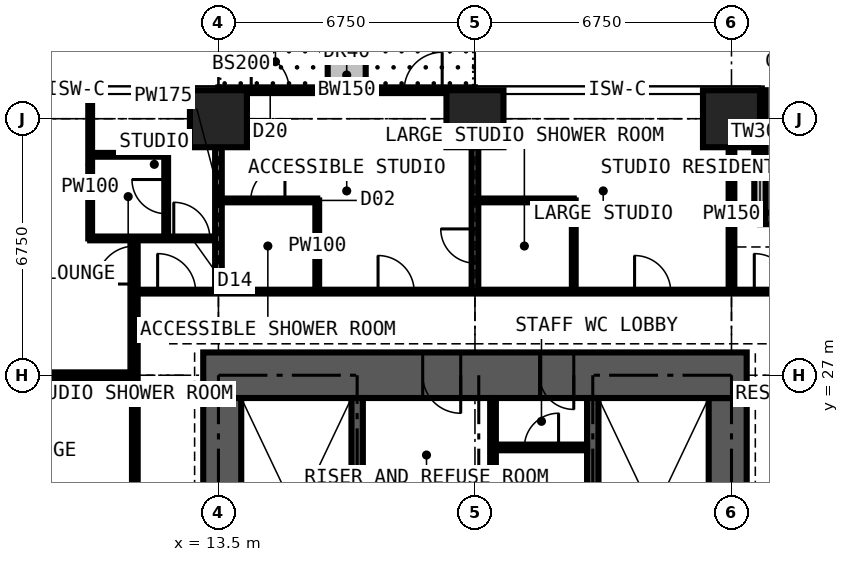
"""IFC4 building model, lengths in metres.
Left out: names, types, materials, properties, quantities, classifications, styles, units other than length and angle.
Written with IfcOpenShell. Run it as: python <this file> out.ifc"""

import sys

from ifc_helpers import new_model, si_unit, direction, frame, frame_2d, origin, origin_2d, place, context, subcontext, project, spatial, rectangle, extrude, element, fill, save


model = new_model("IFC4")
c1 = context("Model", 3, precision=1e-05, world=origin(), true_north=direction((0.0, 1.0)))
c2 = subcontext(c1, "Body", "Model", "MODEL_VIEW")
j1 = project(units=[si_unit("LENGTHUNIT", "METRE"), si_unit("PLANEANGLEUNIT", "RADIAN")], contexts=[c1])
p1 = place(None, origin())
s1 = spatial("IfcSite", under=j1, at=p1, CompositionType="ELEMENT")
p2 = place(p1, origin())
s2 = spatial("IfcBuilding", under=s1, at=p2, CompositionType="ELEMENT")
p3 = place(p2, frame((0.0, 0.0, 163.8)))
s3 = spatial("IfcBuildingStorey", under=s2, at=p3, CompositionType="ELEMENT", Elevation=163.8)
for number, where, z_axis, x_axis in (
    (1, (13.5, 33.75, 0.0), (0.0, 0.0, 1.0), (1.0, 0.0, 0.0)),
    (2, (20.25, 33.75, 0.0), (0.0, 0.0, 1.0), (1.0, 0.0, 0.0)),
    (3, (27.0, 33.75, 0.0), (0.0, 0.0, 1.0), (1.0, 0.0, 0.0)),
):
    element("IfcColumn", number, at=place(p3, frame(where, z_axis=z_axis, x_axis=x_axis)), inside=s3, PredefinedType="COLUMN", context=c2, shape_type="SweptSolid", body=[
        extrude(rectangle(XDim=1.5, YDim=1.5, at=origin_2d()), origin(), (0.0, 0.0, 1.0), 3.6),
    ])
p4 = place(p3, frame((26.9, 14.1, 0.0), z_axis=(0.0, 0.0, 1.0), x_axis=(0.0, 1.0, 0.0)))
e4 = element("IfcWall", 4, at=p4, inside=s3, PredefinedType="SHEAR", context=c2, shape_type="SweptSolid", body=[
    extrude(rectangle(XDim=12.3, YDim=1.0, at=frame_2d((6.15, 0.0))), origin(), (0.0, 0.0, 1.0), 3.6),
])
p5 = place(p4, frame((3.65, 0.0, 0.0)))
e5 = element("IfcOpeningElement", 5, at=p5, cuts=e4, PredefinedType="OPENING", context=c2, shape_type="SweptSolid", body=[
    extrude(rectangle(XDim=1.2, YDim=2.2, at=frame_2d((0.6, 1.1))), frame((0.0, 0.51, 0.0), z_axis=(0.0, -1.0, 0.0), x_axis=(1.0, 0.0, 0.0)), (0.0, 0.0, 1.0), 1.02),
])
p6 = place(p3, frame((27.4, 27.0, 0.0), z_axis=(0.0, 0.0, 1.0), x_axis=(-1.0, 0.0, 0.0)))
e6 = element("IfcWall", 6, at=p6, inside=s3, PredefinedType="SHEAR", context=c2, shape_type="SweptSolid", body=[
    extrude(rectangle(XDim=14.3, YDim=1.2, at=frame_2d((7.15, 0.0))), origin(), (0.0, 0.0, 1.0), 3.6),
])
p7 = place(p6, frame((4.55, 0.0, 0.0)))
e7 = element("IfcOpeningElement", 7, at=p7, cuts=e6, PredefinedType="OPENING", context=c2, shape_type="SweptSolid", body=[
    extrude(rectangle(XDim=0.9, YDim=2.2, at=frame_2d((0.45, 1.1))), frame((0.0, 0.61, 0.0), z_axis=(0.0, -1.0, 0.0), x_axis=(1.0, 0.0, 0.0)), (0.0, 0.0, 1.0), 1.22),
])
p8 = place(p6, frame((7.525, 0.0, 0.0)))
e8 = element("IfcOpeningElement", 8, at=p8, cuts=e6, PredefinedType="OPENING", context=c2, shape_type="SweptSolid", body=[
    extrude(rectangle(XDim=1.0, YDim=2.2, at=frame_2d((0.5, 1.1))), frame((0.0, 0.61, 0.0), z_axis=(0.0, -1.0, 0.0), x_axis=(1.0, 0.0, 0.0)), (0.0, 0.0, 1.0), 1.22),
])
p9 = place(p3, frame((13.6, 26.4, 0.0), z_axis=(0.0, 0.0, 1.0), x_axis=(0.0, -1.0, 0.0)))
e9 = element("IfcWall", 9, at=p9, inside=s3, PredefinedType="SHEAR", context=c2, shape_type="SweptSolid", body=[
    extrude(rectangle(XDim=12.3, YDim=1.0, at=frame_2d((6.15, 0.0))), origin(), (0.0, 0.0, 1.0), 3.6),
])
p10 = place(p9, frame((7.45, 0.0, 0.0)))
e10 = element("IfcOpeningElement", 10, at=p10, cuts=e9, PredefinedType="OPENING", context=c2, shape_type="SweptSolid", body=[
    extrude(rectangle(XDim=1.2, YDim=2.2, at=frame_2d((0.6, 1.1))), frame((0.0, 0.51, 0.0), z_axis=(0.0, -1.0, 0.0), x_axis=(1.0, 0.0, 0.0)), (0.0, 0.0, 1.0), 1.02),
])
p11 = place(p3, frame((31.125, 31.125, 0.0), z_axis=(0.0, 0.0, 1.0), x_axis=(-1.0, 0.0, 0.0)))
e11 = element("IfcWall", 11, at=p11, inside=s3, PredefinedType="SOLIDWALL", context=c2, shape_type="SweptSolid", body=[
    extrude(rectangle(XDim=3.375, YDim=0.3, at=frame_2d((1.688, 0.0))), origin(), (0.0, 0.0, 1.0), 3.375),
])
p12 = place(p11, frame((0.788, 0.0, 0.6)))
e12 = element("IfcOpeningElement", 12, at=p12, cuts=e11, PredefinedType="OPENING", context=c2, shape_type="SweptSolid", body=[
    extrude(rectangle(XDim=1.8, YDim=2.1, at=frame_2d((0.9, 1.05))), frame((0.0, 0.16, 0.0), z_axis=(0.0, -1.0, 0.0), x_axis=(1.0, 0.0, 0.0)), (0.0, 0.0, 1.0), 0.32),
])
p13 = place(p3, frame((27.75, 31.125, 0.0), z_axis=(0.0, 0.0, 1.0), x_axis=(0.0, 1.0, 0.0)))
e13 = element("IfcWall", 13, at=p13, inside=s3, PredefinedType="SOLIDWALL", context=c2, shape_type="SweptSolid", body=[
    extrude(rectangle(XDim=3.375, YDim=0.3, at=frame_2d((1.688, 0.0))), origin(), (0.0, 0.0, 1.0), 3.375),
])
p14 = place(p13, frame((0.268, 0.0, 0.9)))
e14 = element("IfcOpeningElement", 14, at=p14, cuts=e13, PredefinedType="OPENING", context=c2, shape_type="SweptSolid", body=[
    extrude(rectangle(XDim=1.5, YDim=1.8, at=frame_2d((0.75, 0.9))), frame((0.0, 0.16, 0.0), z_axis=(0.0, -1.0, 0.0), x_axis=(1.0, 0.0, 0.0)), (0.0, 0.0, 1.0), 0.32),
])
p15 = place(p3, frame((13.5, 34.5, 0.0), z_axis=(0.0, 0.0, 1.0), x_axis=(1.0, 0.0, 0.0)))
e15 = element("IfcWall", 15, at=p15, inside=s3, PredefinedType="SOLIDWALL", context=c2, shape_type="SweptSolid", body=[
    extrude(rectangle(XDim=6.75, YDim=0.15, at=frame_2d((3.375, 0.0))), origin(), (0.0, 0.0, 1.0), 3.375),
])
p16 = place(p15, frame((0.863, 0.0, 0.0)))
e16 = element("IfcOpeningElement", 16, at=p16, cuts=e15, PredefinedType="OPENING", context=c2, shape_type="SweptSolid", body=[
    extrude(rectangle(XDim=1.0, YDim=2.2, at=frame_2d((0.5, 1.1))), frame((0.0, 0.085, 0.0), z_axis=(0.0, -1.0, 0.0), x_axis=(1.0, 0.0, 0.0)), (0.0, 0.0, 1.0), 0.17),
])
p17 = place(p15, frame((1.975, 0.0, 0.9)))
e17 = element("IfcOpeningElement", 17, at=p17, cuts=e15, PredefinedType="OPENING", context=c2, shape_type="SweptSolid", body=[
    extrude(rectangle(XDim=1.2, YDim=1.8, at=frame_2d((0.6, 0.9))), frame((0.0, 0.085, 0.0), z_axis=(0.0, -1.0, 0.0), x_axis=(1.0, 0.0, 0.0)), (0.0, 0.0, 1.0), 0.17),
])
p18 = place(p15, frame((4.887, 0.0, 0.0)))
e18 = element("IfcOpeningElement", 18, at=p18, cuts=e15, PredefinedType="OPENING", context=c2, shape_type="SweptSolid", body=[
    extrude(rectangle(XDim=1.0, YDim=2.2, at=frame_2d((0.5, 1.1))), frame((0.0, 0.085, 0.0), z_axis=(0.0, -1.0, 0.0), x_axis=(1.0, 0.0, 0.0)), (0.0, 0.0, 1.0), 0.17),
])
p19 = place(p15, frame((3.575, 0.0, 0.9)))
e19 = element("IfcOpeningElement", 19, at=p19, cuts=e15, PredefinedType="OPENING", context=c2, shape_type="SweptSolid", body=[
    extrude(rectangle(XDim=1.2, YDim=1.8, at=frame_2d((0.6, 0.9))), frame((0.0, 0.085, 0.0), z_axis=(0.0, -1.0, 0.0), x_axis=(1.0, 0.0, 0.0)), (0.0, 0.0, 1.0), 0.17),
])
p20 = place(p3, frame((16.875, 34.6, 0.0), z_axis=(0.0, 0.0, 1.0), x_axis=(0.0, 1.0, 0.0)))
e20 = element("IfcWall", 20, at=p20, inside=s3, PredefinedType="USERDEFINED", context=c2, shape_type="SweptSolid", body=[
    extrude(rectangle(XDim=2.2, YDim=1.0, at=frame_2d((1.1, 0.0))), origin(), (0.0, 0.0, 1.0), 0.9),
])
for number, where, z_axis, x_axis in (
    (21, (17.15, 20.3, 0.0), (0.0, 0.0, 1.0), (0.0, 1.0, 0.0)),
    (22, (23.35, 20.3, 0.0), (0.0, 0.0, 1.0), (0.0, 1.0, 0.0)),
):
    element("IfcWall", number, at=place(p3, frame(where, z_axis=z_axis, x_axis=x_axis)), inside=s3, PredefinedType="SHEAR", context=c2, shape_type="SweptSolid", body=[
        extrude(rectangle(XDim=6.1, YDim=0.3, at=frame_2d((3.05, 0.0))), origin(), (0.0, 0.0, 1.0), 3.6),
    ])
p21 = place(p3, frame((20.725, 23.4, 0.0), z_axis=(0.0, 0.0, 1.0), x_axis=(0.0, 1.0, 0.0)))
e23 = element("IfcWall", 23, at=p21, inside=s3, PredefinedType="PARTITIONING", context=c2, shape_type="SweptSolid", body=[
    extrude(rectangle(XDim=3.0, YDim=0.15, at=frame_2d((1.5, 0.0))), origin(), (0.0, 0.0, 1.0), 3.375),
])
p22 = place(p3, frame((20.8, 25.1, 0.0), z_axis=(0.0, 0.0, 1.0), x_axis=(1.0, 0.0, 0.0)))
e24 = element("IfcWall", 24, at=p22, inside=s3, PredefinedType="PARTITIONING", context=c2, shape_type="SweptSolid", body=[
    extrude(rectangle(XDim=2.4, YDim=0.15, at=frame_2d((1.2, 0.0))), origin(), (0.0, 0.0, 1.0), 3.375),
])
p23 = place(p22, frame((0.75, 0.0, 0.0)))
e25 = element("IfcOpeningElement", 25, at=p23, cuts=e24, PredefinedType="OPENING", context=c2, shape_type="SweptSolid", body=[
    extrude(rectangle(XDim=0.9, YDim=2.2, at=frame_2d((0.45, 1.1))), frame((0.0, 0.085, 0.0), z_axis=(0.0, -1.0, 0.0), x_axis=(1.0, 0.0, 0.0)), (0.0, 0.0, 1.0), 0.17),
])
p24 = place(p3, frame((3.35, 27.0, 0.0), z_axis=(0.0, 0.0, 1.0), x_axis=(1.0, 0.0, 0.0)))
e26 = element("IfcWall", 26, at=p24, inside=s3, PredefinedType="PARTITIONING", context=c2, shape_type="SweptSolid", body=[
    extrude(rectangle(XDim=7.95, YDim=0.15, at=frame_2d((3.975, 0.0))), origin(), (0.0, 0.0, 1.0), 2.806),
])
p25 = place(p3, frame((10.125, 30.6, 0.0), z_axis=(0.0, 0.0, 1.0), x_axis=(0.0, 1.0, 0.0)))
e27 = element("IfcWall", 27, at=p25, inside=s3, PredefinedType="PARTITIONING", context=c2, shape_type="SweptSolid", body=[
    extrude(rectangle(XDim=3.884, YDim=0.1, at=frame_2d((1.942, 0.0))), origin(), (0.0, 0.0, 1.0), 3.375),
])
p26 = place(p3, frame((10.125, 30.6, 0.0), z_axis=(0.0, 0.0, 1.0), x_axis=(1.0, 0.0, 0.0)))
e28 = element("IfcWall", 28, at=p26, inside=s3, PredefinedType="PARTITIONING", context=c2, shape_type="SweptSolid", body=[
    extrude(rectangle(XDim=3.375, YDim=0.1, at=frame_2d((1.688, 0.0))), origin(), (0.0, 0.0, 1.0), 3.375),
])
p27 = place(p26, frame((2.2, 0.0, 0.0)))
e29 = element("IfcOpeningElement", 29, at=p27, cuts=e28, PredefinedType="OPENING", context=c2, shape_type="SweptSolid", body=[
    extrude(rectangle(XDim=0.95, YDim=2.2, at=frame_2d((0.475, 1.1))), frame((0.0, 0.06, 0.0), z_axis=(0.0, -1.0, 0.0), x_axis=(1.0, 0.0, 0.0)), (0.0, 0.0, 1.0), 0.12),
])
p28 = place(p3, frame((10.125, 32.8, 0.0), z_axis=(0.0, 0.0, 1.0), x_axis=(1.0, 0.0, 0.0)))
e30 = element("IfcWall", 30, at=p28, inside=s3, PredefinedType="PARTITIONING", context=c2, shape_type="SweptSolid", body=[
    extrude(rectangle(XDim=2.0, YDim=0.1, at=frame_2d((1.0, 0.0))), origin(), (0.0, 0.0, 1.0), 3.375),
])
p29 = place(p3, frame((11.3, 11.3, 0.0), z_axis=(0.0, 0.0, 1.0), x_axis=(0.0, 1.0, 0.0)))
e31 = element("IfcWall", 31, at=p29, inside=s3, PredefinedType="PARTITIONING", context=c2, shape_type="SweptSolid", body=[
    extrude(rectangle(XDim=19.3, YDim=0.15, at=frame_2d((9.65, 0.0))), origin(), (0.0, 0.0, 1.0), 3.375),
])
p30 = place(p29, frame((18.1, 0.0, 0.0)))
e32 = element("IfcOpeningElement", 32, at=p30, cuts=e31, PredefinedType="OPENING", context=c2, shape_type="SweptSolid", body=[
    extrude(rectangle(XDim=1.0, YDim=2.2, at=frame_2d((0.5, 1.1))), frame((0.0, 0.085, 0.0), z_axis=(0.0, -1.0, 0.0), x_axis=(1.0, 0.0, 0.0)), (0.0, 0.0, 1.0), 0.17),
])
p31 = place(p29, frame((10.137, 0.0, 0.0)))
e33 = element("IfcOpeningElement", 33, at=p31, cuts=e31, PredefinedType="OPENING", context=c2, shape_type="SweptSolid", body=[
    extrude(rectangle(XDim=1.0, YDim=2.2, at=frame_2d((0.5, 1.1))), frame((0.0, 0.085, 0.0), z_axis=(0.0, -1.0, 0.0), x_axis=(1.0, 0.0, 0.0)), (0.0, 0.0, 1.0), 0.17),
])
p32 = place(p3, frame((11.3, 29.2, 0.0), z_axis=(0.0, 0.0, 1.0), x_axis=(1.0, 0.0, 0.0)))
e34 = element("IfcWall", 34, at=p32, inside=s3, PredefinedType="PARTITIONING", context=c2, shape_type="SweptSolid", body=[
    extrude(rectangle(XDim=19.809, YDim=0.1, at=frame_2d((9.904, 0.0))), origin(), (0.0, 0.0, 1.0), 3.375),
])
p33 = place(p32, frame((16.3, 0.0, 0.0)))
e35 = element("IfcOpeningElement", 35, at=p33, cuts=e34, PredefinedType="OPENING", context=c2, shape_type="SweptSolid", body=[
    extrude(rectangle(XDim=1.0, YDim=2.2, at=frame_2d((0.5, 1.1))), frame((0.0, 0.06, 0.0), z_axis=(0.0, -1.0, 0.0), x_axis=(1.0, 0.0, 0.0)), (0.0, 0.0, 1.0), 0.12),
])
p34 = place(p32, frame((6.4, 0.0, 0.0)))
e36 = element("IfcOpeningElement", 36, at=p34, cuts=e34, PredefinedType="OPENING", context=c2, shape_type="SweptSolid", body=[
    extrude(rectangle(XDim=0.95, YDim=2.2, at=frame_2d((0.475, 1.1))), frame((0.0, 0.06, 0.0), z_axis=(0.0, -1.0, 0.0), x_axis=(1.0, 0.0, 0.0)), (0.0, 0.0, 1.0), 0.12),
])
p35 = place(p32, frame((13.15, 0.0, 0.0)))
e37 = element("IfcOpeningElement", 37, at=p35, cuts=e34, PredefinedType="OPENING", context=c2, shape_type="SweptSolid", body=[
    extrude(rectangle(XDim=0.95, YDim=2.2, at=frame_2d((0.475, 1.1))), frame((0.0, 0.06, 0.0), z_axis=(0.0, -1.0, 0.0), x_axis=(1.0, 0.0, 0.0)), (0.0, 0.0, 1.0), 0.12),
])
p36 = place(p32, frame((0.6, 0.0, 0.0)))
e38 = element("IfcOpeningElement", 38, at=p36, cuts=e34, PredefinedType="OPENING", context=c2, shape_type="SweptSolid", body=[
    extrude(rectangle(XDim=1.0, YDim=2.2, at=frame_2d((0.5, 1.1))), frame((0.0, 0.06, 0.0), z_axis=(0.0, -1.0, 0.0), x_axis=(1.0, 0.0, 0.0)), (0.0, 0.0, 1.0), 0.12),
])
p37 = place(p3, frame((12.125, 30.6, 0.0), z_axis=(0.0, 0.0, 1.0), x_axis=(0.0, 1.0, 0.0)))
e39 = element("IfcWall", 39, at=p37, inside=s3, PredefinedType="PARTITIONING", context=c2, shape_type="SweptSolid", body=[
    extrude(rectangle(XDim=2.2, YDim=0.1, at=frame_2d((1.1, 0.0))), origin(), (0.0, 0.0, 1.0), 3.375),
])
p38 = place(p37, frame((0.65, 0.0, 0.0)))
e40 = element("IfcOpeningElement", 40, at=p38, cuts=e39, PredefinedType="OPENING", context=c2, shape_type="SweptSolid", body=[
    extrude(rectangle(XDim=0.9, YDim=2.2, at=frame_2d((0.45, 1.1))), frame((0.0, 0.06, 0.0), z_axis=(0.0, -1.0, 0.0), x_axis=(1.0, 0.0, 0.0)), (0.0, 0.0, 1.0), 0.12),
])
p39 = place(p3, frame((13.5, 29.2, 0.0), z_axis=(0.0, 0.0, 1.0), x_axis=(0.0, 1.0, 0.0)))
e41 = element("IfcWall", 41, at=p39, inside=s3, PredefinedType="PARTITIONING", context=c2, shape_type="SweptSolid", body=[
    extrude(rectangle(XDim=5.284, YDim=0.175, at=frame_2d((2.642, 0.0))), origin(), (0.0, 0.0, 1.0), 2.806),
])
p40 = place(p3, frame((13.5, 31.6, 0.0), z_axis=(0.0, 0.0, 1.0), x_axis=(1.0, 0.0, 0.0)))
e42 = element("IfcWall", 42, at=p40, inside=s3, PredefinedType="PARTITIONING", context=c2, shape_type="SweptSolid", body=[
    extrude(rectangle(XDim=2.6, YDim=0.1, at=frame_2d((1.3, 0.0))), origin(), (0.0, 0.0, 1.0), 3.375),
])
p41 = place(p40, frame((0.85, 0.0, 0.0)))
e43 = element("IfcOpeningElement", 43, at=p41, cuts=e42, PredefinedType="OPENING", context=c2, shape_type="SweptSolid", body=[
    extrude(rectangle(XDim=0.9, YDim=2.2, at=frame_2d((0.45, 1.1))), frame((0.0, 0.06, 0.0), z_axis=(0.0, -1.0, 0.0), x_axis=(1.0, 0.0, 0.0)), (0.0, 0.0, 1.0), 0.12),
])
p42 = place(p3, frame((16.1, 29.2, 0.0), z_axis=(0.0, 0.0, 1.0), x_axis=(0.0, 1.0, 0.0)))
e44 = element("IfcWall", 44, at=p42, inside=s3, PredefinedType="PARTITIONING", context=c2, shape_type="SweptSolid", body=[
    extrude(rectangle(XDim=2.4, YDim=0.1, at=frame_2d((1.2, 0.0))), origin(), (0.0, 0.0, 1.0), 3.375),
])
p43 = place(p3, frame((20.25, 29.2, 0.0), z_axis=(0.0, 0.0, 1.0), x_axis=(0.0, 1.0, 0.0)))
e45 = element("IfcWall", 45, at=p43, inside=s3, PredefinedType="PARTITIONING", context=c2, shape_type="SweptSolid", body=[
    extrude(rectangle(XDim=5.284, YDim=0.175, at=frame_2d((2.642, 0.0))), origin(), (0.0, 0.0, 1.0), 2.806),
])
p44 = place(p43, frame((0.75, 0.0, 0.0)))
e46 = element("IfcOpeningElement", 46, at=p44, cuts=e45, PredefinedType="OPENING", context=c2, shape_type="SweptSolid", body=[
    extrude(rectangle(XDim=0.9, YDim=2.2, at=frame_2d((0.45, 1.1))), frame((0.0, 0.097, 0.0), z_axis=(0.0, -1.0, 0.0), x_axis=(1.0, 0.0, 0.0)), (0.0, 0.0, 1.0), 0.195),
])
p45 = place(p3, frame((20.25, 31.6, 0.0), z_axis=(0.0, 0.0, 1.0), x_axis=(1.0, 0.0, 0.0)))
e47 = element("IfcWall", 47, at=p45, inside=s3, PredefinedType="PARTITIONING", context=c2, shape_type="SweptSolid", body=[
    extrude(rectangle(XDim=2.6, YDim=0.1, at=frame_2d((1.3, 0.0))), origin(), (0.0, 0.0, 1.0), 3.375),
])
p46 = place(p3, frame((22.85, 29.2, 0.0), z_axis=(0.0, 0.0, 1.0), x_axis=(0.0, 1.0, 0.0)))
e48 = element("IfcWall", 48, at=p46, inside=s3, PredefinedType="PARTITIONING", context=c2, shape_type="SweptSolid", body=[
    extrude(rectangle(XDim=2.4, YDim=0.1, at=frame_2d((1.2, 0.0))), origin(), (0.0, 0.0, 1.0), 3.375),
])
p47 = place(p3, frame((27.0, 29.2, 0.0), z_axis=(0.0, 0.0, 1.0), x_axis=(0.0, 1.0, 0.0)))
e49 = element("IfcWall", 49, at=p47, inside=s3, PredefinedType="PARTITIONING", context=c2, shape_type="SweptSolid", body=[
    extrude(rectangle(XDim=5.284, YDim=0.15, at=frame_2d((2.642, 0.0))), origin(), (0.0, 0.0, 1.0), 2.806),
])
p48 = place(p14, origin())
e50 = element("IfcWindow", 50, at=p48, inside=s3, PartitioningType="SINGLE_PANEL", PredefinedType="WINDOW", context=c2, shape_type="SweptSolid", body=[
    extrude(rectangle(XDim=1.5, YDim=1.8, at=frame_2d((0.75, 0.9))), frame((0.0, 0.03, 0.0), z_axis=(0.0, -1.0, 0.0), x_axis=(1.0, 0.0, 0.0)), (0.0, 0.0, 1.0), 0.06),
])
fill(e14, e50)
p49 = place(p16, origin())
e51 = element("IfcDoor", 51, at=p49, inside=s3, OperationType="SINGLE_SWING_LEFT", PredefinedType="DOOR", context=c2, shape_type="SweptSolid", body=[
    extrude(rectangle(XDim=1.0, YDim=2.2, at=frame_2d((0.5, 1.1))), frame((0.0, 0.025, 0.0), z_axis=(0.0, -1.0, 0.0), x_axis=(1.0, 0.0, 0.0)), (0.0, 0.0, 1.0), 0.05),
])
fill(e16, e51)
p50 = place(p17, origin())
e52 = element("IfcWindow", 52, at=p50, inside=s3, PartitioningType="SINGLE_PANEL", PredefinedType="WINDOW", context=c2, shape_type="SweptSolid", body=[
    extrude(rectangle(XDim=1.2, YDim=1.8, at=frame_2d((0.6, 0.9))), frame((0.0, 0.03, 0.0), z_axis=(0.0, -1.0, 0.0), x_axis=(1.0, 0.0, 0.0)), (0.0, 0.0, 1.0), 0.06),
])
fill(e17, e52)
p51 = place(p18, origin())
e53 = element("IfcDoor", 53, at=p51, inside=s3, OperationType="SINGLE_SWING_RIGHT", PredefinedType="DOOR", context=c2, shape_type="SweptSolid", body=[
    extrude(rectangle(XDim=1.0, YDim=2.2, at=frame_2d((0.5, 1.1))), frame((0.0, 0.025, 0.0), z_axis=(0.0, -1.0, 0.0), x_axis=(1.0, 0.0, 0.0)), (0.0, 0.0, 1.0), 0.05),
])
fill(e18, e53)
p52 = place(p19, origin())
e54 = element("IfcWindow", 54, at=p52, inside=s3, PartitioningType="SINGLE_PANEL", PredefinedType="WINDOW", context=c2, shape_type="SweptSolid", body=[
    extrude(rectangle(XDim=1.2, YDim=1.8, at=frame_2d((0.6, 0.9))), frame((0.0, 0.03, 0.0), z_axis=(0.0, -1.0, 0.0), x_axis=(1.0, 0.0, 0.0)), (0.0, 0.0, 1.0), 0.06),
])
fill(e19, e54)
p53 = place(p23, origin())
e55 = element("IfcDoor", 55, at=p53, inside=s3, OperationType="SINGLE_SWING_RIGHT", PredefinedType="DOOR", context=c2, shape_type="SweptSolid", body=[
    extrude(rectangle(XDim=0.9, YDim=2.2, at=frame_2d((0.45, 1.1))), frame((0.0, 0.025, 0.0), z_axis=(0.0, -1.0, 0.0), x_axis=(1.0, 0.0, 0.0)), (0.0, 0.0, 1.0), 0.05),
])
fill(e25, e55)
p54 = place(p7, origin())
e56 = element("IfcDoor", 56, at=p54, inside=s3, OperationType="SINGLE_SWING_LEFT", PredefinedType="DOOR", context=c2, shape_type="SweptSolid", body=[
    extrude(rectangle(XDim=0.9, YDim=2.2, at=frame_2d((0.45, 1.1))), frame((0.0, 0.4, 0.0), z_axis=(0.0, -1.0, 0.0), x_axis=(1.0, 0.0, 0.0)), (0.0, 0.0, 1.0), 0.8),
])
fill(e7, e56)
p55 = place(p8, origin())
e57 = element("IfcDoor", 57, at=p55, inside=s3, OperationType="SINGLE_SWING_LEFT", PredefinedType="DOOR", context=c2, shape_type="SweptSolid", body=[
    extrude(rectangle(XDim=1.0, YDim=2.2, at=frame_2d((0.5, 1.1))), frame((0.0, 0.025, 0.0), z_axis=(0.0, -1.0, 0.0), x_axis=(1.0, 0.0, 0.0)), (0.0, 0.0, 1.0), 0.05),
])
fill(e8, e57)
p56 = place(p33, origin())
e58 = element("IfcDoor", 58, at=p56, inside=s3, OperationType="SINGLE_SWING_LEFT", PredefinedType="DOOR", context=c2, shape_type="SweptSolid", body=[
    extrude(rectangle(XDim=1.0, YDim=2.2, at=frame_2d((0.5, 1.1))), frame((0.0, 0.025, 0.0), z_axis=(0.0, -1.0, 0.0), x_axis=(1.0, 0.0, 0.0)), (0.0, 0.0, 1.0), 0.05),
])
fill(e35, e58)
p57 = place(p34, origin())
e59 = element("IfcDoor", 59, at=p57, inside=s3, OperationType="SINGLE_SWING_LEFT", PredefinedType="DOOR", context=c2, shape_type="SweptSolid", body=[
    extrude(rectangle(XDim=0.95, YDim=2.2, at=frame_2d((0.475, 1.1))), frame((0.0, 0.025, 0.0), z_axis=(0.0, -1.0, 0.0), x_axis=(1.0, 0.0, 0.0)), (0.0, 0.0, 1.0), 0.05),
])
fill(e36, e59)
p58 = place(p41, origin())
e60 = element("IfcDoor", 60, at=p58, inside=s3, OperationType="SINGLE_SWING_RIGHT", PredefinedType="DOOR", context=c2, shape_type="SweptSolid", body=[
    extrude(rectangle(XDim=0.9, YDim=2.2, at=frame_2d((0.45, 1.1))), frame((0.0, 0.025, 0.0), z_axis=(0.0, -1.0, 0.0), x_axis=(1.0, 0.0, 0.0)), (0.0, 0.0, 1.0), 0.05),
])
fill(e43, e60)
p59 = place(p35, origin())
e61 = element("IfcDoor", 61, at=p59, inside=s3, OperationType="SINGLE_SWING_LEFT", PredefinedType="DOOR", context=c2, shape_type="SweptSolid", body=[
    extrude(rectangle(XDim=0.95, YDim=2.2, at=frame_2d((0.475, 1.1))), frame((0.0, 0.025, 0.0), z_axis=(0.0, -1.0, 0.0), x_axis=(1.0, 0.0, 0.0)), (0.0, 0.0, 1.0), 0.05),
])
fill(e37, e61)
p60 = place(p44, origin())
e62 = element("IfcDoor", 62, at=p60, inside=s3, OperationType="SINGLE_SWING_RIGHT", PredefinedType="DOOR", context=c2, shape_type="SweptSolid", body=[
    extrude(rectangle(XDim=0.9, YDim=2.2, at=frame_2d((0.45, 1.1))), frame((0.0, 0.025, 0.0), z_axis=(0.0, -1.0, 0.0), x_axis=(1.0, 0.0, 0.0)), (0.0, 0.0, 1.0), 0.05),
])
fill(e46, e62)
p61 = place(p27, origin())
e63 = element("IfcDoor", 63, at=p61, inside=s3, OperationType="SINGLE_SWING_LEFT", PredefinedType="DOOR", context=c2, shape_type="SweptSolid", body=[
    extrude(rectangle(XDim=0.95, YDim=2.2, at=frame_2d((0.475, 1.1))), frame((0.0, 0.025, 0.0), z_axis=(0.0, -1.0, 0.0), x_axis=(1.0, 0.0, 0.0)), (0.0, 0.0, 1.0), 0.05),
])
fill(e29, e63)
p62 = place(p38, origin())
e64 = element("IfcDoor", 64, at=p62, inside=s3, OperationType="SINGLE_SWING_RIGHT", PredefinedType="DOOR", context=c2, shape_type="SweptSolid", body=[
    extrude(rectangle(XDim=0.9, YDim=2.2, at=frame_2d((0.45, 1.1))), frame((0.0, 0.025, 0.0), z_axis=(0.0, -1.0, 0.0), x_axis=(1.0, 0.0, 0.0)), (0.0, 0.0, 1.0), 0.05),
])
fill(e40, e64)
p63 = place(p36, origin())
e65 = element("IfcDoor", 65, at=p63, inside=s3, OperationType="SINGLE_SWING_LEFT", PredefinedType="DOOR", context=c2, shape_type="SweptSolid", body=[
    extrude(rectangle(XDim=1.0, YDim=2.2, at=frame_2d((0.5, 1.1))), frame((0.0, 0.025, 0.0), z_axis=(0.0, -1.0, 0.0), x_axis=(1.0, 0.0, 0.0)), (0.0, 0.0, 1.0), 0.05),
])
fill(e38, e65)
p64 = place(p30, origin())
e66 = element("IfcDoor", 66, at=p64, inside=s3, OperationType="SINGLE_SWING_LEFT", PredefinedType="DOOR", context=c2, shape_type="SweptSolid", body=[
    extrude(rectangle(XDim=1.0, YDim=2.2, at=frame_2d((0.5, 1.1))), frame((0.0, 0.025, 0.0), z_axis=(0.0, -1.0, 0.0), x_axis=(1.0, 0.0, 0.0)), (0.0, 0.0, 1.0), 0.05),
])
fill(e32, e66)
save(model, sys.argv[1])
